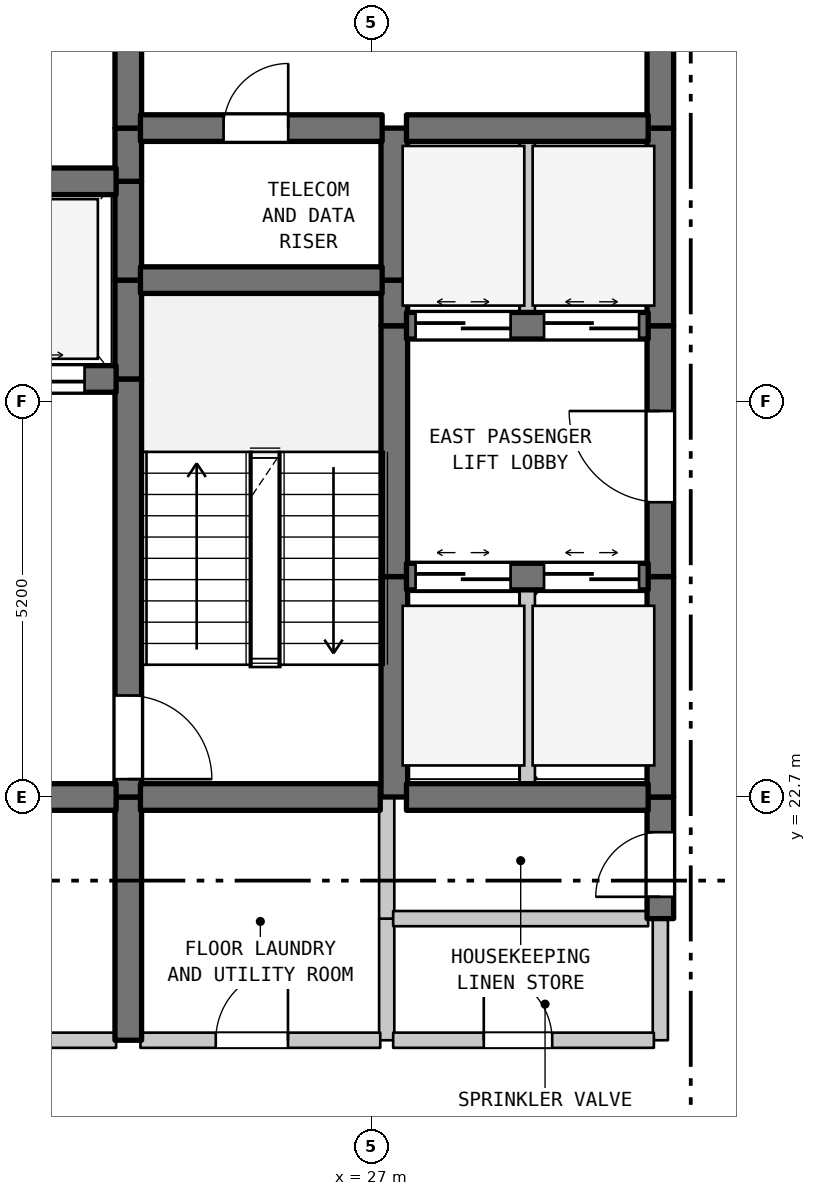
"""IFC4 building model, lengths in metres.
Left out: names, types, materials, properties, quantities, classifications, styles, units other than length and angle.
Written with IfcOpenShell. Run it as: python <this file> out.ifc"""

import sys

from ifc_helpers import new_model, si_unit, direction, frame, frame_2d, origin, place, context, subcontext, project, spatial, rectangle, extrude, element, fill, save


model = new_model("IFC4")
c1 = context("Model", 3, precision=1e-05, world=origin(), true_north=direction((0.0, 1.0)))
c2 = subcontext(c1, "Body", "Model", "MODEL_VIEW")
j1 = project(units=[si_unit("LENGTHUNIT", "METRE"), si_unit("PLANEANGLEUNIT", "RADIAN")], contexts=[c1])
p1 = place(None, origin())
s1 = spatial("IfcSite", under=j1, at=p1, CompositionType="ELEMENT")
p2 = place(p1, origin())
s2 = spatial("IfcBuilding", under=s1, at=p2, CompositionType="ELEMENT")
p3 = place(p2, frame((0.0, 0.0, 137.2)))
s3 = spatial("IfcBuildingStorey", under=s2, at=p3, CompositionType="ELEMENT", Elevation=137.2)
p4 = place(p3, frame((23.8, 19.5, 0.0), z_axis=(0.0, 0.0, 1.0), x_axis=(0.0, 1.0, 0.0)))
e1 = element("IfcWall", 1, at=p4, inside=s3, PredefinedType="SHEAR", context=c2, shape_type="SweptSolid", body=[
    extrude(rectangle(XDim=3.2, YDim=0.35, at=frame_2d((1.6, 0.0))), origin(), (0.0, 0.0, 1.0), 3.385),
])
p5 = place(p3, frame((23.8, 22.7, 0.0), z_axis=(0.0, 0.0, 1.0), x_axis=(0.0, 1.0, 0.0)))
e2 = element("IfcWall", 2, at=p5, inside=s3, PredefinedType="SHEAR", context=c2, shape_type="SweptSolid", body=[
    extrude(rectangle(XDim=5.5, YDim=0.35, at=frame_2d((2.75, 0.0))), origin(), (0.0, 0.0, 1.0), 3.385),
])
p6 = place(p5, frame((0.235, 0.0, 0.0)))
e3 = element("IfcOpeningElement", 3, at=p6, cuts=e2, PredefinedType="OPENING", context=c2, shape_type="SweptSolid", body=[
    extrude(rectangle(XDim=1.1, YDim=2.15, at=frame_2d((0.55, 1.075))), frame((0.0, 0.185, 0.0), z_axis=(0.0, -1.0, 0.0), x_axis=(1.0, 0.0, 0.0)), (0.0, 0.0, 1.0), 0.37),
])
for number, where, z_axis, x_axis in (
    (4, (23.8, 28.2, 0.0), (0.0, 0.0, 1.0), (0.0, 1.0, 0.0)),
    (5, (23.8, 29.5, 0.0), (0.0, 0.0, 1.0), (0.0, 1.0, 0.0)),
):
    element("IfcWall", number, at=place(p3, frame(where, z_axis=z_axis, x_axis=x_axis)), inside=s3, PredefinedType="SHEAR", context=c2, shape_type="SweptSolid", body=[
        extrude(rectangle(XDim=1.3, YDim=0.35, at=frame_2d((0.65, 0.0))), origin(), (0.0, 0.0, 1.0), 3.385),
    ])
p7 = place(p3, frame((23.8, 30.8, 0.0), z_axis=(0.0, 0.0, 1.0), x_axis=(0.0, 1.0, 0.0)))
e6 = element("IfcWall", 6, at=p7, inside=s3, PredefinedType="SHEAR", context=c2, shape_type="SweptSolid", body=[
    extrude(rectangle(XDim=0.7, YDim=0.35, at=frame_2d((0.35, 0.0))), origin(), (0.0, 0.0, 1.0), 3.385),
])
p8 = place(p3, frame((23.8, 31.5, 0.0), z_axis=(0.0, 0.0, 1.0), x_axis=(0.0, 1.0, 0.0)))
e7 = element("IfcWall", 7, at=p8, inside=s3, PredefinedType="SHEAR", context=c2, shape_type="SweptSolid", body=[
    extrude(rectangle(XDim=3.5, YDim=0.35, at=frame_2d((1.75, 0.0))), origin(), (0.0, 0.0, 1.0), 3.385),
])
p9 = place(p8, frame((1.127, 0.0, 0.0)))
e8 = element("IfcOpeningElement", 8, at=p9, cuts=e7, PredefinedType="OPENING", context=c2, shape_type="SweptSolid", body=[
    extrude(rectangle(XDim=1.1, YDim=2.15, at=frame_2d((0.55, 1.075))), frame((0.0, 0.185, 0.0), z_axis=(0.0, -1.0, 0.0), x_axis=(1.0, 0.0, 0.0)), (0.0, 0.0, 1.0), 0.37),
])
p10 = place(p3, frame((27.2, 19.5, 0.0), z_axis=(0.0, 0.0, 1.0), x_axis=(0.0, 1.0, 0.0)))
e9 = element("IfcWall", 9, at=p10, inside=s3, PredefinedType="STANDARD", context=c2, shape_type="SweptSolid", body=[
    extrude(rectangle(XDim=1.6, YDim=0.2, at=frame_2d((0.8, 0.0))), origin(), (0.0, 0.0, 1.0), 3.385),
])
p11 = place(p3, frame((27.2, 21.1, 0.0), z_axis=(0.0, 0.0, 1.0), x_axis=(0.0, 1.0, 0.0)))
e10 = element("IfcWall", 10, at=p11, inside=s3, PredefinedType="STANDARD", context=c2, shape_type="SweptSolid", body=[
    extrude(rectangle(XDim=1.6, YDim=0.2, at=frame_2d((0.8, 0.0))), origin(), (0.0, 0.0, 1.0), 3.385),
])
p12 = place(p3, frame((27.3, 22.7, 0.0), z_axis=(0.0, 0.0, 1.0), x_axis=(0.0, 1.0, 0.0)))
e11 = element("IfcWall", 11, at=p12, inside=s3, PredefinedType="SHEAR", context=c2, shape_type="SweptSolid", body=[
    extrude(rectangle(XDim=2.9, YDim=0.35, at=frame_2d((1.45, 0.0))), origin(), (0.0, 0.0, 1.0), 3.385),
])
p13 = place(p3, frame((27.3, 25.6, 0.0), z_axis=(0.0, 0.0, 1.0), x_axis=(0.0, 1.0, 0.0)))
e12 = element("IfcWall", 12, at=p13, inside=s3, PredefinedType="SHEAR", context=c2, shape_type="SweptSolid", body=[
    extrude(rectangle(XDim=3.3, YDim=0.35, at=frame_2d((1.65, 0.0))), origin(), (0.0, 0.0, 1.0), 3.385),
])
p14 = place(p3, frame((27.3, 28.9, 0.0), z_axis=(0.0, 0.0, 1.0), x_axis=(0.0, 1.0, 0.0)))
e13 = element("IfcWall", 13, at=p14, inside=s3, PredefinedType="SHEAR", context=c2, shape_type="SweptSolid", body=[
    extrude(rectangle(XDim=0.6, YDim=0.35, at=frame_2d((0.3, 0.0))), origin(), (0.0, 0.0, 1.0), 3.385),
])
p15 = place(p3, frame((27.3, 29.5, 0.0), z_axis=(0.0, 0.0, 1.0), x_axis=(0.0, 1.0, 0.0)))
e14 = element("IfcWall", 14, at=p15, inside=s3, PredefinedType="SHEAR", context=c2, shape_type="SweptSolid", body=[
    extrude(rectangle(XDim=2.0, YDim=0.35, at=frame_2d((1.0, 0.0))), origin(), (0.0, 0.0, 1.0), 3.385),
])
p16 = place(p3, frame((29.05, 22.7, 0.0), z_axis=(0.0, 0.0, 1.0), x_axis=(0.0, 1.0, 0.0)))
e15 = element("IfcWall", 15, at=p16, inside=s3, PredefinedType="STANDARD", context=c2, shape_type="SweptSolid", body=[
    extrude(rectangle(XDim=2.9, YDim=0.2, at=frame_2d((1.45, 0.0))), origin(), (0.0, 0.0, 1.0), 3.385),
])
p17 = place(p3, frame((29.05, 28.9, 0.0), z_axis=(0.0, 0.0, 1.0), x_axis=(0.0, 1.0, 0.0)))
e16 = element("IfcWall", 16, at=p17, inside=s3, PredefinedType="STANDARD", context=c2, shape_type="SweptSolid", body=[
    extrude(rectangle(XDim=2.6, YDim=0.2, at=frame_2d((1.3, 0.0))), origin(), (0.0, 0.0, 1.0), 3.385),
])
p18 = place(p3, frame((30.8, 19.5, 0.0), z_axis=(0.0, 0.0, 1.0), x_axis=(0.0, 1.0, 0.0)))
e17 = element("IfcWall", 17, at=p18, inside=s3, PredefinedType="STANDARD", context=c2, shape_type="SweptSolid", body=[
    extrude(rectangle(XDim=1.6, YDim=0.2, at=frame_2d((0.8, 0.0))), origin(), (0.0, 0.0, 1.0), 3.385),
])
p19 = place(p3, frame((30.8, 21.1, 0.0), z_axis=(0.0, 0.0, 1.0), x_axis=(0.0, 1.0, 0.0)))
e18 = element("IfcWall", 18, at=p19, inside=s3, PredefinedType="SHEAR", context=c2, shape_type="SweptSolid", body=[
    extrude(rectangle(XDim=1.6, YDim=0.35, at=frame_2d((0.8, 0.0))), origin(), (0.0, 0.0, 1.0), 3.385),
])
p20 = place(p19, frame((0.287, 0.0, 0.0)))
e19 = element("IfcOpeningElement", 19, at=p20, cuts=e18, PredefinedType="OPENING", context=c2, shape_type="SweptSolid", body=[
    extrude(rectangle(XDim=0.85, YDim=2.1, at=frame_2d((0.425, 1.05))), frame((0.0, 0.185, 0.0), z_axis=(0.0, -1.0, 0.0), x_axis=(1.0, 0.0, 0.0)), (0.0, 0.0, 1.0), 0.37),
])
p21 = place(p3, frame((30.8, 22.7, 0.0), z_axis=(0.0, 0.0, 1.0), x_axis=(0.0, 1.0, 0.0)))
e20 = element("IfcWall", 20, at=p21, inside=s3, PredefinedType="SHEAR", context=c2, shape_type="SweptSolid", body=[
    extrude(rectangle(XDim=2.9, YDim=0.35, at=frame_2d((1.45, 0.0))), origin(), (0.0, 0.0, 1.0), 3.385),
])
p22 = place(p3, frame((30.8, 25.6, 0.0), z_axis=(0.0, 0.0, 1.0), x_axis=(0.0, 1.0, 0.0)))
e21 = element("IfcWall", 21, at=p22, inside=s3, PredefinedType="SHEAR", context=c2, shape_type="SweptSolid", body=[
    extrude(rectangle(XDim=3.3, YDim=0.35, at=frame_2d((1.65, 0.0))), origin(), (0.0, 0.0, 1.0), 3.385),
])
p23 = place(p22, frame((0.978, 0.0, 0.0)))
e22 = element("IfcOpeningElement", 22, at=p23, cuts=e21, PredefinedType="OPENING", context=c2, shape_type="SweptSolid", body=[
    extrude(rectangle(XDim=1.2, YDim=2.2, at=frame_2d((0.6, 1.1))), frame((0.0, 0.185, 0.0), z_axis=(0.0, -1.0, 0.0), x_axis=(1.0, 0.0, 0.0)), (0.0, 0.0, 1.0), 0.37),
])
p24 = place(p3, frame((30.8, 28.9, 0.0), z_axis=(0.0, 0.0, 1.0), x_axis=(0.0, 1.0, 0.0)))
e23 = element("IfcWall", 23, at=p24, inside=s3, PredefinedType="SHEAR", context=c2, shape_type="SweptSolid", body=[
    extrude(rectangle(XDim=2.6, YDim=0.35, at=frame_2d((1.3, 0.0))), origin(), (0.0, 0.0, 1.0), 3.385),
])
p25 = place(p3, frame((30.8, 31.5, 0.0), z_axis=(0.0, 0.0, 1.0), x_axis=(0.0, 1.0, 0.0)))
e24 = element("IfcWall", 24, at=p25, inside=s3, PredefinedType="SHEAR", context=c2, shape_type="SweptSolid", body=[
    extrude(rectangle(XDim=3.5, YDim=0.35, at=frame_2d((1.75, 0.0))), origin(), (0.0, 0.0, 1.0), 3.385),
])
p26 = place(p25, frame((1.15, 0.0, 0.0)))
e25 = element("IfcOpeningElement", 25, at=p26, cuts=e24, PredefinedType="OPENING", context=c2, shape_type="SweptSolid", body=[
    extrude(rectangle(XDim=1.2, YDim=2.2, at=frame_2d((0.6, 1.1))), frame((0.0, 0.185, 0.0), z_axis=(0.0, -1.0, 0.0), x_axis=(1.0, 0.0, 0.0)), (0.0, 0.0, 1.0), 0.37),
])
p27 = place(p3, frame((19.16, 19.5, 0.0), z_axis=(0.0, 0.0, 1.0), x_axis=(1.0, 0.0, 0.0)))
e26 = element("IfcWall", 26, at=p27, inside=s3, PredefinedType="STANDARD", context=c2, shape_type="SweptSolid", body=[
    extrude(rectangle(XDim=4.48, YDim=0.2, at=frame_2d((2.24, 0.0))), origin(), (0.0, 0.0, 1.0), 3.385),
])
p28 = place(p27, frame((1.64, 0.0, 0.0)))
e27 = element("IfcOpeningElement", 27, at=p28, cuts=e26, PredefinedType="OPENING", context=c2, shape_type="SweptSolid", body=[
    extrude(rectangle(XDim=1.2, YDim=2.2, at=frame_2d((0.6, 1.1))), frame((0.0, 0.11, 0.0), z_axis=(0.0, -1.0, 0.0), x_axis=(1.0, 0.0, 0.0)), (0.0, 0.0, 1.0), 0.22),
])
p29 = place(p3, frame((23.96, 19.5, 0.0), z_axis=(0.0, 0.0, 1.0), x_axis=(1.0, 0.0, 0.0)))
e28 = element("IfcWall", 28, at=p29, inside=s3, PredefinedType="STANDARD", context=c2, shape_type="SweptSolid", body=[
    extrude(rectangle(XDim=3.155, YDim=0.2, at=frame_2d((1.578, 0.0))), origin(), (0.0, 0.0, 1.0), 3.385),
])
p30 = place(p29, frame((0.991, 0.0, 0.0)))
e29 = element("IfcOpeningElement", 29, at=p30, cuts=e28, PredefinedType="OPENING", context=c2, shape_type="SweptSolid", body=[
    extrude(rectangle(XDim=0.95, YDim=2.15, at=frame_2d((0.475, 1.075))), frame((0.0, 0.11, 0.0), z_axis=(0.0, -1.0, 0.0), x_axis=(1.0, 0.0, 0.0)), (0.0, 0.0, 1.0), 0.22),
])
p31 = place(p3, frame((27.285, 19.5, 0.0), z_axis=(0.0, 0.0, 1.0), x_axis=(1.0, 0.0, 0.0)))
e30 = element("IfcWall", 30, at=p31, inside=s3, PredefinedType="STANDARD", context=c2, shape_type="SweptSolid", body=[
    extrude(rectangle(XDim=3.43, YDim=0.2, at=frame_2d((1.715, 0.0))), origin(), (0.0, 0.0, 1.0), 3.385),
])
p32 = place(p31, frame((1.192, 0.0, 0.0)))
e31 = element("IfcOpeningElement", 31, at=p32, cuts=e30, PredefinedType="OPENING", context=c2, shape_type="SweptSolid", body=[
    extrude(rectangle(XDim=0.9, YDim=2.15, at=frame_2d((0.45, 1.075))), frame((0.0, 0.11, 0.0), z_axis=(0.0, -1.0, 0.0), x_axis=(1.0, 0.0, 0.0)), (0.0, 0.0, 1.0), 0.22),
])
p33 = place(p3, frame((27.285, 21.1, 0.0), z_axis=(0.0, 0.0, 1.0), x_axis=(1.0, 0.0, 0.0)))
e32 = element("IfcWall", 32, at=p33, inside=s3, PredefinedType="STANDARD", context=c2, shape_type="SweptSolid", body=[
    extrude(rectangle(XDim=3.355, YDim=0.2, at=frame_2d((1.677, 0.0))), origin(), (0.0, 0.0, 1.0), 3.385),
])
p34 = place(p3, frame((19.16, 22.7, 0.0), z_axis=(0.0, 0.0, 1.0), x_axis=(1.0, 0.0, 0.0)))
e33 = element("IfcWall", 33, at=p34, inside=s3, PredefinedType="SHEAR", context=c2, shape_type="SweptSolid", body=[
    extrude(rectangle(XDim=4.48, YDim=0.35, at=frame_2d((2.24, 0.0))), origin(), (0.0, 0.0, 1.0), 3.385),
])
p35 = place(p34, frame((1.64, 0.0, 0.0)))
e34 = element("IfcOpeningElement", 34, at=p35, cuts=e33, PredefinedType="OPENING", context=c2, shape_type="SweptSolid", body=[
    extrude(rectangle(XDim=1.2, YDim=2.2, at=frame_2d((0.6, 1.1))), frame((0.0, 0.185, 0.0), z_axis=(0.0, -1.0, 0.0), x_axis=(1.0, 0.0, 0.0)), (0.0, 0.0, 1.0), 0.37),
])
p36 = place(p3, frame((23.96, 22.7, 0.0), z_axis=(0.0, 0.0, 1.0), x_axis=(1.0, 0.0, 0.0)))
e35 = element("IfcWall", 35, at=p36, inside=s3, PredefinedType="SHEAR", context=c2, shape_type="SweptSolid", body=[
    extrude(rectangle(XDim=3.155, YDim=0.35, at=frame_2d((1.578, 0.0))), origin(), (0.0, 0.0, 1.0), 3.385),
])
p37 = place(p3, frame((27.46, 22.7, 0.0), z_axis=(0.0, 0.0, 1.0), x_axis=(1.0, 0.0, 0.0)))
e36 = element("IfcWall", 36, at=p37, inside=s3, PredefinedType="SHEAR", context=c2, shape_type="SweptSolid", body=[
    extrude(rectangle(XDim=3.18, YDim=0.35, at=frame_2d((1.59, 0.0))), origin(), (0.0, 0.0, 1.0), 3.385),
])
p38 = place(p3, frame((27.46, 25.6, 0.0), z_axis=(0.0, 0.0, 1.0), x_axis=(1.0, 0.0, 0.0)))
e37 = element("IfcWall", 37, at=p38, inside=s3, PredefinedType="SHEAR", context=c2, shape_type="SweptSolid", body=[
    extrude(rectangle(XDim=3.18, YDim=0.35, at=frame_2d((1.59, 0.0))), origin(), (0.0, 0.0, 1.0), 3.385),
])
p39 = place(p38, frame((0.12, 0.0, 0.0)))
e38 = element("IfcOpeningElement", 38, at=p39, cuts=e37, PredefinedType="OPENING", context=c2, shape_type="SweptSolid", body=[
    extrude(rectangle(XDim=1.25, YDim=2.2, at=frame_2d((0.625, 1.1))), frame((0.0, 0.185, 0.0), z_axis=(0.0, -1.0, 0.0), x_axis=(1.0, 0.0, 0.0)), (0.0, 0.0, 1.0), 0.37),
])
p40 = place(p38, frame((1.81, 0.0, 0.0)))
e39 = element("IfcOpeningElement", 39, at=p40, cuts=e37, PredefinedType="OPENING", context=c2, shape_type="SweptSolid", body=[
    extrude(rectangle(XDim=1.25, YDim=2.2, at=frame_2d((0.625, 1.1))), frame((0.0, 0.185, 0.0), z_axis=(0.0, -1.0, 0.0), x_axis=(1.0, 0.0, 0.0)), (0.0, 0.0, 1.0), 0.37),
])
p41 = place(p3, frame((19.16, 28.2, 0.0), z_axis=(0.0, 0.0, 1.0), x_axis=(1.0, 0.0, 0.0)))
e40 = element("IfcWall", 40, at=p41, inside=s3, PredefinedType="SHEAR", context=c2, shape_type="SweptSolid", body=[
    extrude(rectangle(XDim=4.48, YDim=0.35, at=frame_2d((2.24, 0.0))), origin(), (0.0, 0.0, 1.0), 3.385),
])
p42 = place(p41, frame((0.415, 0.0, 0.0)))
e41 = element("IfcOpeningElement", 41, at=p42, cuts=e40, PredefinedType="OPENING", context=c2, shape_type="SweptSolid", body=[
    extrude(rectangle(XDim=1.25, YDim=2.2, at=frame_2d((0.625, 1.1))), frame((0.0, 0.185, 0.0), z_axis=(0.0, -1.0, 0.0), x_axis=(1.0, 0.0, 0.0)), (0.0, 0.0, 1.0), 0.37),
])
p43 = place(p41, frame((2.815, 0.0, 0.0)))
e42 = element("IfcOpeningElement", 42, at=p43, cuts=e40, PredefinedType="OPENING", context=c2, shape_type="SweptSolid", body=[
    extrude(rectangle(XDim=1.25, YDim=2.2, at=frame_2d((0.625, 1.1))), frame((0.0, 0.185, 0.0), z_axis=(0.0, -1.0, 0.0), x_axis=(1.0, 0.0, 0.0)), (0.0, 0.0, 1.0), 0.37),
])
p44 = place(p3, frame((27.46, 28.9, 0.0), z_axis=(0.0, 0.0, 1.0), x_axis=(1.0, 0.0, 0.0)))
e43 = element("IfcWall", 43, at=p44, inside=s3, PredefinedType="SHEAR", context=c2, shape_type="SweptSolid", body=[
    extrude(rectangle(XDim=3.18, YDim=0.35, at=frame_2d((1.59, 0.0))), origin(), (0.0, 0.0, 1.0), 3.385),
])
p45 = place(p44, frame((0.12, 0.0, 0.0)))
e44 = element("IfcOpeningElement", 44, at=p45, cuts=e43, PredefinedType="OPENING", context=c2, shape_type="SweptSolid", body=[
    extrude(rectangle(XDim=1.25, YDim=2.2, at=frame_2d((0.625, 1.1))), frame((0.0, 0.185, 0.0), z_axis=(0.0, -1.0, 0.0), x_axis=(1.0, 0.0, 0.0)), (0.0, 0.0, 1.0), 0.37),
])
p46 = place(p44, frame((1.81, 0.0, 0.0)))
e45 = element("IfcOpeningElement", 45, at=p46, cuts=e43, PredefinedType="OPENING", context=c2, shape_type="SweptSolid", body=[
    extrude(rectangle(XDim=1.25, YDim=2.2, at=frame_2d((0.625, 1.1))), frame((0.0, 0.185, 0.0), z_axis=(0.0, -1.0, 0.0), x_axis=(1.0, 0.0, 0.0)), (0.0, 0.0, 1.0), 0.37),
])
p47 = place(p3, frame((23.96, 29.5, 0.0), z_axis=(0.0, 0.0, 1.0), x_axis=(1.0, 0.0, 0.0)))
e46 = element("IfcWall", 46, at=p47, inside=s3, PredefinedType="SHEAR", context=c2, shape_type="SweptSolid", body=[
    extrude(rectangle(XDim=3.18, YDim=0.35, at=frame_2d((1.59, 0.0))), origin(), (0.0, 0.0, 1.0), 3.385),
])
p48 = place(p3, frame((19.16, 30.8, 0.0), z_axis=(0.0, 0.0, 1.0), x_axis=(1.0, 0.0, 0.0)))
e47 = element("IfcWall", 47, at=p48, inside=s3, PredefinedType="SHEAR", context=c2, shape_type="SweptSolid", body=[
    extrude(rectangle(XDim=4.48, YDim=0.35, at=frame_2d((2.24, 0.0))), origin(), (0.0, 0.0, 1.0), 3.385),
])
p49 = place(p3, frame((23.96, 31.5, 0.0), z_axis=(0.0, 0.0, 1.0), x_axis=(1.0, 0.0, 0.0)))
e48 = element("IfcWall", 48, at=p49, inside=s3, PredefinedType="SHEAR", context=c2, shape_type="SweptSolid", body=[
    extrude(rectangle(XDim=3.18, YDim=0.35, at=frame_2d((1.59, 0.0))), origin(), (0.0, 0.0, 1.0), 3.385),
])
p50 = place(p49, frame((1.094, 0.0, 0.0)))
e49 = element("IfcOpeningElement", 49, at=p50, cuts=e48, PredefinedType="OPENING", context=c2, shape_type="SweptSolid", body=[
    extrude(rectangle(XDim=0.85, YDim=2.1, at=frame_2d((0.425, 1.05))), frame((0.0, 0.185, 0.0), z_axis=(0.0, -1.0, 0.0), x_axis=(1.0, 0.0, 0.0)), (0.0, 0.0, 1.0), 0.37),
])
p51 = place(p3, frame((27.46, 31.5, 0.0), z_axis=(0.0, 0.0, 1.0), x_axis=(1.0, 0.0, 0.0)))
e50 = element("IfcWall", 50, at=p51, inside=s3, PredefinedType="SHEAR", context=c2, shape_type="SweptSolid", body=[
    extrude(rectangle(XDim=3.18, YDim=0.35, at=frame_2d((1.59, 0.0))), origin(), (0.0, 0.0, 1.0), 3.385),
])
p52 = place(p6, frame((1.1, 0.0, 0.0), z_axis=(0.0, 0.0, 1.0), x_axis=(-1.0, 0.0, 0.0)))
e51 = element("IfcDoor", 51, at=p52, inside=s3, OperationType="SINGLE_SWING_LEFT", PredefinedType="DOOR", context=c2, shape_type="SweptSolid", body=[
    extrude(rectangle(XDim=1.1, YDim=2.15, at=frame_2d((0.55, 1.075))), frame((0.0, 0.025, 0.0), z_axis=(0.0, -1.0, 0.0), x_axis=(1.0, 0.0, 0.0)), (0.0, 0.0, 1.0), 0.05),
])
fill(e3, e51)
p53 = place(p20, origin())
e52 = element("IfcDoor", 52, at=p53, inside=s3, OperationType="SINGLE_SWING_LEFT", PredefinedType="DOOR", context=c2, shape_type="SweptSolid", body=[
    extrude(rectangle(XDim=0.85, YDim=2.1, at=frame_2d((0.425, 1.05))), frame((0.0, 0.025, 0.0), z_axis=(0.0, -1.0, 0.0), x_axis=(1.0, 0.0, 0.0)), (0.0, 0.0, 1.0), 0.05),
])
fill(e19, e52)
p54 = place(p23, origin())
e53 = element("IfcDoor", 53, at=p54, inside=s3, OperationType="SINGLE_SWING_RIGHT", PredefinedType="DOOR", context=c2, shape_type="SweptSolid", body=[
    extrude(rectangle(XDim=1.2, YDim=2.2, at=frame_2d((0.6, 1.1))), frame((0.0, 0.025, 0.0), z_axis=(0.0, -1.0, 0.0), x_axis=(1.0, 0.0, 0.0)), (0.0, 0.0, 1.0), 0.05),
])
fill(e22, e53)
p55 = place(p30, origin())
e54 = element("IfcDoor", 54, at=p55, inside=s3, OperationType="SINGLE_SWING_RIGHT", PredefinedType="DOOR", context=c2, shape_type="SweptSolid", body=[
    extrude(rectangle(XDim=0.95, YDim=2.15, at=frame_2d((0.475, 1.075))), frame((0.0, 0.025, 0.0), z_axis=(0.0, -1.0, 0.0), x_axis=(1.0, 0.0, 0.0)), (0.0, 0.0, 1.0), 0.05),
])
fill(e29, e54)
p56 = place(p32, origin())
e55 = element("IfcDoor", 55, at=p56, inside=s3, OperationType="SINGLE_SWING_LEFT", PredefinedType="DOOR", context=c2, shape_type="SweptSolid", body=[
    extrude(rectangle(XDim=0.9, YDim=2.15, at=frame_2d((0.45, 1.075))), frame((0.0, 0.025, 0.0), z_axis=(0.0, -1.0, 0.0), x_axis=(1.0, 0.0, 0.0)), (0.0, 0.0, 1.0), 0.05),
])
fill(e31, e55)
p57 = place(p39, origin())
e56 = element("IfcDoor", 56, at=p57, inside=s3, OperationType="DOUBLE_DOOR_SLIDING", PredefinedType="DOOR", context=c2, shape_type="SweptSolid", body=[
    extrude(rectangle(XDim=1.25, YDim=2.2, at=frame_2d((0.625, 1.1))), frame((0.0, 0.025, 0.0), z_axis=(0.0, -1.0, 0.0), x_axis=(1.0, 0.0, 0.0)), (0.0, 0.0, 1.0), 0.05),
])
fill(e38, e56)
p58 = place(p40, origin())
e57 = element("IfcDoor", 57, at=p58, inside=s3, OperationType="DOUBLE_DOOR_SLIDING", PredefinedType="DOOR", context=c2, shape_type="SweptSolid", body=[
    extrude(rectangle(XDim=1.25, YDim=2.2, at=frame_2d((0.625, 1.1))), frame((0.0, 0.025, 0.0), z_axis=(0.0, -1.0, 0.0), x_axis=(1.0, 0.0, 0.0)), (0.0, 0.0, 1.0), 0.05),
])
fill(e39, e57)
p59 = place(p43, origin())
e58 = element("IfcDoor", 58, at=p59, inside=s3, OperationType="DOUBLE_DOOR_SLIDING", PredefinedType="DOOR", context=c2, shape_type="SweptSolid", body=[
    extrude(rectangle(XDim=1.25, YDim=2.2, at=frame_2d((0.625, 1.1))), frame((0.0, 0.025, 0.0), z_axis=(0.0, -1.0, 0.0), x_axis=(1.0, 0.0, 0.0)), (0.0, 0.0, 1.0), 0.05),
])
fill(e42, e58)
p60 = place(p45, origin())
e59 = element("IfcDoor", 59, at=p60, inside=s3, OperationType="DOUBLE_DOOR_SLIDING", PredefinedType="DOOR", context=c2, shape_type="SweptSolid", body=[
    extrude(rectangle(XDim=1.25, YDim=2.2, at=frame_2d((0.625, 1.1))), frame((0.0, 0.025, 0.0), z_axis=(0.0, -1.0, 0.0), x_axis=(1.0, 0.0, 0.0)), (0.0, 0.0, 1.0), 0.05),
])
fill(e44, e59)
p61 = place(p46, origin())
e60 = element("IfcDoor", 60, at=p61, inside=s3, OperationType="DOUBLE_DOOR_SLIDING", PredefinedType="DOOR", context=c2, shape_type="SweptSolid", body=[
    extrude(rectangle(XDim=1.25, YDim=2.2, at=frame_2d((0.625, 1.1))), frame((0.0, 0.025, 0.0), z_axis=(0.0, -1.0, 0.0), x_axis=(1.0, 0.0, 0.0)), (0.0, 0.0, 1.0), 0.05),
])
fill(e45, e60)
p62 = place(p50, origin())
e61 = element("IfcDoor", 61, at=p62, inside=s3, OperationType="SINGLE_SWING_RIGHT", PredefinedType="DOOR", context=c2, shape_type="SweptSolid", body=[
    extrude(rectangle(XDim=0.85, YDim=2.1, at=frame_2d((0.425, 1.05))), frame((0.0, 0.025, 0.0), z_axis=(0.0, -1.0, 0.0), x_axis=(1.0, 0.0, 0.0)), (0.0, 0.0, 1.0), 0.05),
])
fill(e49, e61)
save(model, sys.argv[1])
